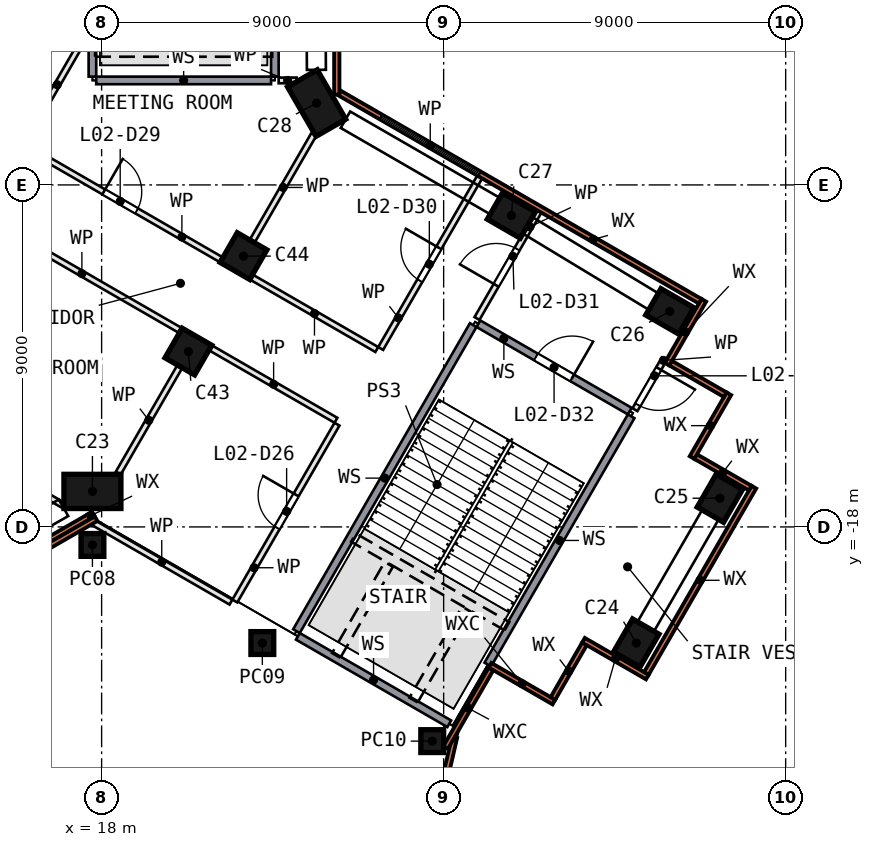
"""IFC4 building model, lengths in metres.
Left out: names, types, materials, properties, quantities, classifications, styles, units other than length and angle.
Written with IfcOpenShell. Run it as: python <this file> out.ifc"""

import sys

from ifc_helpers import new_model, si_unit, direction, frame, frame_2d, origin, origin_2d, place, context, subcontext, project, spatial, rectangle, extrude, element, fill, save


model = new_model("IFC4")
c1 = context("Model", 3, precision=1e-05, world=origin(), true_north=direction((0.0, 1.0)))
c2 = subcontext(c1, "Body", "Model", "MODEL_VIEW")
j1 = project(units=[si_unit("LENGTHUNIT", "METRE"), si_unit("PLANEANGLEUNIT", "RADIAN")], contexts=[c1])
p1 = place(None, origin())
s1 = spatial("IfcSite", under=j1, at=p1, CompositionType="ELEMENT")
p2 = place(p1, origin())
s2 = spatial("IfcBuilding", under=s1, at=p2, CompositionType="ELEMENT")
p3 = place(p2, frame((0.0, 0.0, 14.0)))
s3 = spatial("IfcBuildingStorey", under=s2, at=p3, CompositionType="ELEMENT", Elevation=14.0)
p4 = place(p3, frame((17.758, -17.065, 0.0), z_axis=(0.0, 0.0, 1.0), x_axis=(-1.0, 0.0, 0.0)))
e1 = element("IfcColumn", 1, at=p4, inside=s3, PredefinedType="COLUMN", context=c2, shape_type="SweptSolid", body=[
    extrude(rectangle(XDim=1.5, YDim=0.9, at=origin_2d()), origin(), (0.0, 0.0, 1.0), 4.55),
])
for number, where, z_axis, x_axis in (
    (2, (32.069, -21.055, 0.0), (0.0, 0.0, 1.0), (0.5, 0.866, 0.0)),
    (3, (34.269, -17.245, 0.0), (0.0, 0.0, 1.0), (0.5, 0.866, 0.0)),
    (4, (32.951, -12.327, 0.0), (0.0, 0.0, 1.0), (-0.866, 0.5, 0.0)),
    (5, (28.783, -9.805, 0.0), (0.0, 0.0, 1.0), (-0.866, 0.5, 0.0)),
):
    element("IfcColumn", number, at=place(p3, frame(where, z_axis=z_axis, x_axis=x_axis)), inside=s3, PredefinedType="COLUMN", context=c2, shape_type="SweptSolid", body=[
        extrude(rectangle(XDim=1.0, YDim=0.8, at=origin_2d()), origin(), (0.0, 0.0, 1.0), 4.55),
    ])
p5 = place(p3, frame((23.658, -6.846, 0.0), z_axis=(0.0, 0.0, 1.0), x_axis=(0.5, -0.866025404, 0.0)))
e6 = element("IfcColumn", 6, at=p5, inside=s3, PredefinedType="COLUMN", context=c2, shape_type="SweptSolid", body=[
    extrude(rectangle(XDim=1.5, YDim=0.9, at=origin_2d()), origin(), (0.0, 0.0, 1.0), 4.55),
])
for number, where, z_axis, x_axis in (
    (7, (20.283, -13.385, 0.0), (0.0, 0.0, 1.0), (0.866, -0.5, 0.0)),
    (8, (21.733, -10.873, 0.0), (0.0, 0.0, 1.0), (0.866, -0.5, 0.0)),
):
    element("IfcColumn", number, at=place(p3, frame(where, z_axis=z_axis, x_axis=x_axis)), inside=s3, PredefinedType="COLUMN", context=c2, shape_type="SweptSolid", body=[
        extrude(rectangle(XDim=0.9, YDim=0.9, at=origin_2d()), origin(), (0.0, 0.0, 1.0), 4.55),
    ])
for number, where, z_axis, x_axis in (
    (9, (17.758, -18.474, 0.0), (0.0, 0.0, 1.0), (0.0, -1.0, 0.0)),
    (10, (22.229, -21.055, 0.0), (0.0, 0.0, 1.0), (0.0, -1.0, 0.0)),
    (11, (26.7, -23.637, 0.0), (0.0, 0.0, 1.0), (0.0, -1.0, 0.0)),
):
    element("IfcColumn", number, at=place(p3, frame(where, z_axis=z_axis, x_axis=x_axis)), inside=s3, PredefinedType="COLUMN", context=c2, shape_type="SweptSolid", body=[
        extrude(rectangle(XDim=0.6, YDim=0.6, at=origin_2d()), origin(), (0.0, 0.0, 1.0), 5.0),
    ])
p6 = place(p3, frame((25.247, -32.36, 0.0), z_axis=(0.0, 0.0, 1.0), x_axis=(0.225288694, 0.974292053, 0.0)))
e12 = element("IfcWall", 12, at=p6, inside=s3, PredefinedType="SOLIDWALL", context=c2, shape_type="SweptSolid", body=[
    extrude(rectangle(XDim=9.056, YDim=0.14, at=frame_2d((4.528, 0.0))), origin(), (0.0, 0.0, 1.0), 4.55),
])
p7 = place(p6, frame((2.496, 0.0, 0.9)))
e13 = element("IfcOpeningElement", 13, at=p7, cuts=e12, PredefinedType="OPENING", context=c2, shape_type="SweptSolid", body=[
    extrude(rectangle(XDim=4.2, YDim=2.7, at=frame_2d((2.1, 1.35))), frame((0.0, 0.08, 0.0), z_axis=(0.0, -1.0, 0.0), x_axis=(1.0, 0.0, 0.0)), (0.0, 0.0, 1.0), 0.16),
])
p8 = place(p3, frame((27.051, -23.807, 0.0), z_axis=(0.0, 0.0, 1.0), x_axis=(0.499969813, 0.866042832, 0.0)))
e14 = element("IfcWall", 14, at=p8, inside=s3, PredefinedType="SOLIDWALL", context=c2, shape_type="SweptSolid", body=[
    extrude(rectangle(XDim=2.392, YDim=0.14, at=frame_2d((1.196, 0.0))), origin(), (0.0, 0.0, 1.0), 4.55),
])
p9 = place(p3, frame((28.221, -21.64, 0.0), z_axis=(0.0, 0.0, 1.0), x_axis=(0.866011627, -0.500023862, 0.0)))
e15 = element("IfcWall", 15, at=p9, inside=s3, PredefinedType="SOLIDWALL", context=c2, shape_type="SweptSolid", body=[
    extrude(rectangle(XDim=1.94, YDim=0.14, at=frame_2d((0.97, 0.0))), origin(), (0.0, 0.0, 1.0), 4.55),
])
p10 = place(p3, frame((29.875, -22.514, 0.0), z_axis=(0.0, 0.0, 1.0), x_axis=(0.499998264, 0.866026406, 0.0)))
e16 = element("IfcWall", 16, at=p10, inside=s3, PredefinedType="SOLIDWALL", context=c2, shape_type="SweptSolid", body=[
    extrude(rectangle(XDim=1.66, YDim=0.14, at=frame_2d((0.83, 0.0))), origin(), (0.0, 0.0, 1.0), 4.55),
])
p11 = place(p3, frame((30.68, -20.981, 0.0), z_axis=(0.0, 0.0, 1.0), x_axis=(0.866043088, -0.499969368, 0.0)))
e17 = element("IfcWall", 17, at=p11, inside=s3, PredefinedType="SOLIDWALL", context=c2, shape_type="SweptSolid", body=[
    extrude(rectangle(XDim=1.94, YDim=0.14, at=frame_2d((0.97, 0.0))), origin(), (0.0, 0.0, 1.0), 4.55),
])
p12 = place(p3, frame((32.334, -21.855, 0.0), z_axis=(0.0, 0.0, 1.0), x_axis=(0.499985074, 0.866034021, 0.0)))
e18 = element("IfcWall", 18, at=p12, inside=s3, PredefinedType="SOLIDWALL", context=c2, shape_type="SweptSolid", body=[
    extrude(rectangle(XDim=5.66, YDim=0.14, at=frame_2d((2.83, 0.0))), origin(), (0.0, 0.0, 1.0), 4.55),
])
p13 = place(p3, frame((35.069, -16.979, 0.0), z_axis=(0.0, 0.0, 1.0), x_axis=(-0.866053324, 0.499951638, 0.0)))
e19 = element("IfcWall", 19, at=p13, inside=s3, PredefinedType="SOLIDWALL", context=c2, shape_type="SweptSolid", body=[
    extrude(rectangle(XDim=1.66, YDim=0.14, at=frame_2d((0.83, 0.0))), origin(), (0.0, 0.0, 1.0), 4.55),
])
p14 = place(p3, frame((33.535, -16.175, 0.0), z_axis=(0.0, 0.0, 1.0), x_axis=(0.500063744, 0.865988598, 0.0)))
e20 = element("IfcWall", 20, at=p14, inside=s3, PredefinedType="SOLIDWALL", context=c2, shape_type="SweptSolid", body=[
    extrude(rectangle(XDim=1.94, YDim=0.14, at=frame_2d((0.97, 0.0))), origin(), (0.0, 0.0, 1.0), 4.55),
])
p15 = place(p3, frame((34.41, -14.52, 0.0), z_axis=(0.0, 0.0, 1.0), x_axis=(-0.865989634, 0.500061949, 0.0)))
e21 = element("IfcWall", 21, at=p15, inside=s3, PredefinedType="SOLIDWALL", context=c2, shape_type="SweptSolid", body=[
    extrude(rectangle(XDim=1.66, YDim=0.14, at=frame_2d((0.83, 0.0))), origin(), (0.0, 0.0, 1.0), 4.55),
])
p16 = place(p3, frame((32.877, -13.716, 0.0), z_axis=(0.0, 0.0, 1.0), x_axis=(0.500023862, 0.866011627, 0.0)))
e22 = element("IfcWall", 22, at=p16, inside=s3, PredefinedType="SOLIDWALL", context=c2, shape_type="SweptSolid", body=[
    extrude(rectangle(XDim=1.94, YDim=0.14, at=frame_2d((0.97, 0.0))), origin(), (0.0, 0.0, 1.0), 4.55),
])
p17 = place(p3, frame((33.751, -12.062, 0.0), z_axis=(0.0, 0.0, 1.0), x_axis=(-0.86602647, 0.499998154, 0.0)))
e23 = element("IfcWall", 23, at=p17, inside=s3, PredefinedType="SOLIDWALL", context=c2, shape_type="SweptSolid", body=[
    extrude(rectangle(XDim=10.961, YDim=0.14, at=frame_2d((5.481, 0.0))), origin(), (0.0, 0.0, 1.0), 4.55),
])
p18 = place(p17, frame((6.702, 0.0, 0.9)))
e24 = element("IfcOpeningElement", 24, at=p18, cuts=e23, PredefinedType="OPENING", context=c2, shape_type="SweptSolid", body=[
    extrude(rectangle(XDim=3.0, YDim=2.7, at=frame_2d((1.5, 1.35))), frame((0.0, 0.08, 0.0), z_axis=(0.0, -1.0, 0.0), x_axis=(1.0, 0.0, 0.0)), (0.0, 0.0, 1.0), 0.16),
])
p19 = place(p3, frame((24.188, -6.621, 0.0), z_axis=(0.0, 0.0, 1.0), x_axis=(0.0, 1.0, 0.0)))
e25 = element("IfcWall", 25, at=p19, inside=s3, PredefinedType="SOLIDWALL", context=c2, shape_type="SweptSolid", body=[
    extrude(rectangle(XDim=13.242, YDim=0.14, at=frame_2d((6.621, 0.0))), origin(), (0.0, 0.0, 1.0), 4.55),
])
p20 = place(p3, frame((6.603, -24.118, 0.0), z_axis=(0.0, 0.0, 1.0), x_axis=(0.866018135, 0.50001259, 0.0)))
e26 = element("IfcWall", 26, at=p20, inside=s3, PredefinedType="SOLIDWALL", context=c2, shape_type="SweptSolid", body=[
    extrude(rectangle(XDim=12.771, YDim=0.14, at=frame_2d((6.386, 0.0))), origin(), (0.0, 0.0, 1.0), 4.55),
])
p21 = place(p20, frame((1.883, 0.0, 0.9)))
e27 = element("IfcOpeningElement", 27, at=p21, cuts=e26, PredefinedType="OPENING", context=c2, shape_type="SweptSolid", body=[
    extrude(rectangle(XDim=2.4, YDim=2.7, at=frame_2d((1.2, 1.35))), frame((0.0, 0.08, 0.0), z_axis=(0.0, -1.0, 0.0), x_axis=(1.0, 0.0, 0.0)), (0.0, 0.0, 1.0), 0.16),
])
p22 = place(p20, frame((7.782, 0.0, 0.9)))
e28 = element("IfcOpeningElement", 28, at=p22, cuts=e26, PredefinedType="OPENING", context=c2, shape_type="SweptSolid", body=[
    extrude(rectangle(XDim=3.6, YDim=2.7, at=frame_2d((1.8, 1.35))), frame((0.0, 0.08, 0.0), z_axis=(0.0, -1.0, 0.0), x_axis=(1.0, 0.0, 0.0)), (0.0, 0.0, 1.0), 0.16),
])
p23 = place(p3, frame((17.688, -17.637, 0.0), z_axis=(0.0, 0.0, 1.0), x_axis=(0.500829891, -0.865545735, 0.0)))
e29 = element("IfcWall", 29, at=p23, inside=s3, PredefinedType="SOLIDWALL", context=c2, shape_type="SweptSolid", body=[
    extrude(rectangle(XDim=0.14, YDim=0.14, at=frame_2d((0.07, 0.0))), origin(), (0.0, 0.0, 1.0), 4.55),
])
p24 = place(p3, frame((17.854, -17.784, 0.0), z_axis=(0.0, 0.0, 1.0), x_axis=(-0.866036463, -0.499980844, 0.0)))
e30 = element("IfcWall", 30, at=p24, inside=s3, PredefinedType="SOLIDWALL", context=c2, shape_type="SweptSolid", body=[
    extrude(rectangle(XDim=7.334, YDim=0.14, at=frame_2d((3.667, 0.0))), origin(), (0.0, 0.0, 1.0), 4.55),
])
p25 = place(p24, frame((1.529, 0.0, 0.9)))
e31 = element("IfcOpeningElement", 31, at=p25, cuts=e30, PredefinedType="OPENING", context=c2, shape_type="SweptSolid", body=[
    extrude(rectangle(XDim=3.6, YDim=2.7, at=frame_2d((1.8, 1.35))), frame((0.0, 0.08, 0.0), z_axis=(0.0, -1.0, 0.0), x_axis=(1.0, 0.0, 0.0)), (0.0, 0.0, 1.0), 0.16),
])
p26 = place(p3, frame((12.014, -14.557, 0.0), z_axis=(0.0, 0.0, 1.0), x_axis=(0.866011812, -0.500023541, 0.0)))
e32 = element("IfcWall", 32, at=p26, inside=s3, PredefinedType="PARTITIONING", context=c2, shape_type="SweptSolid", body=[
    extrude(rectangle(XDim=5.732, YDim=0.15, at=frame_2d((2.866, 0.0))), origin(), (0.0, 0.0, 1.0), 4.55),
])
p27 = place(p26, frame((2.35, 0.0, 0.0)))
e33 = element("IfcOpeningElement", 33, at=p27, cuts=e32, PredefinedType="OPENING", context=c2, shape_type="SweptSolid", body=[
    extrude(rectangle(XDim=1.0, YDim=2.1, at=frame_2d((0.5, 1.05))), frame((0.0, 0.085, 0.0), z_axis=(0.0, -1.0, 0.0), x_axis=(1.0, 0.0, 0.0)), (0.0, 0.0, 1.0), 0.17),
])
p28 = place(p3, frame((14.906, -9.848, 0.0), z_axis=(0.0, 0.0, 1.0), x_axis=(0.866038559, -0.499977214, 0.0)))
e34 = element("IfcWall", 34, at=p28, inside=s3, PredefinedType="PARTITIONING", context=c2, shape_type="SweptSolid", body=[
    extrude(rectangle(XDim=5.945, YDim=0.15, at=frame_2d((2.973, 0.0))), origin(), (0.0, 0.0, 1.0), 4.55),
])
p29 = place(p3, frame((20.886, -13.3, 0.0), z_axis=(0.0, 0.0, 1.0), x_axis=(0.866012734, -0.500021944, 0.0)))
e35 = element("IfcWall", 35, at=p29, inside=s3, PredefinedType="PARTITIONING", context=c2, shape_type="SweptSolid", body=[
    extrude(rectangle(XDim=3.787, YDim=0.15, at=frame_2d((1.894, 0.0))), origin(), (0.0, 0.0, 1.0), 4.55),
])
p30 = place(p3, frame((18.438, -16.585, 0.0), z_axis=(0.0, 0.0, 1.0), x_axis=(0.500027049, 0.866009787, 0.0)))
e36 = element("IfcWall", 36, at=p30, inside=s3, PredefinedType="PARTITIONING", context=c2, shape_type="SweptSolid", body=[
    extrude(rectangle(XDim=3.215, YDim=0.15, at=frame_2d((1.607, 0.0))), origin(), (0.0, 0.0, 1.0), 4.55),
])
p31 = place(p3, frame((17.761, -17.875, 0.0), z_axis=(0.0, 0.0, 1.0), x_axis=(0.866016441, -0.500015524, 0.0)))
e37 = element("IfcWall", 37, at=p31, inside=s3, PredefinedType="PARTITIONING", context=c2, shape_type="SweptSolid", body=[
    extrude(rectangle(XDim=4.206, YDim=0.15, at=frame_2d((2.103, 0.0))), origin(), (0.0, 0.0, 1.0), 4.55),
])
p32 = place(p3, frame((17.858, -6.25, 0.0), z_axis=(0.0, 0.0, 1.0), x_axis=(1.0, 0.0, 0.0)))
e38 = element("IfcWall", 38, at=p32, inside=s3, PredefinedType="SOLIDWALL", context=c2, shape_type="SweptSolid", body=[
    extrude(rectangle(XDim=4.6, YDim=0.2, at=frame_2d((2.3, 0.0))), origin(), (0.0, 0.0, 1.0), 4.55),
])
p33 = place(p3, frame((17.708, -4.845, 0.0), z_axis=(0.0, 0.0, 1.0), x_axis=(-0.499993523, -0.866029143, 0.0)))
e39 = element("IfcWall", 39, at=p33, inside=s3, PredefinedType="PARTITIONING", context=c2, shape_type="SweptSolid", body=[
    extrude(rectangle(XDim=3.508, YDim=0.15, at=frame_2d((1.754, 0.0))), origin(), (0.0, 0.0, 1.0), 4.55),
])
p34 = place(p3, frame((17.758, 3.15, 0.0), z_axis=(0.0, 0.0, 1.0), x_axis=(0.0, -1.0, 0.0)))
e40 = element("IfcWall", 40, at=p34, inside=s3, PredefinedType="SOLIDWALL", context=c2, shape_type="SweptSolid", body=[
    extrude(rectangle(XDim=9.3, YDim=0.2, at=frame_2d((4.65, 0.0))), origin(), (0.0, 0.0, 1.0), 4.55),
])
p35 = place(p3, frame((21.975, -10.458, 0.0), z_axis=(0.0, 0.0, 1.0), x_axis=(0.500027049, 0.866009787, 0.0)))
e41 = element("IfcWall", 41, at=p35, inside=s3, PredefinedType="PARTITIONING", context=c2, shape_type="SweptSolid", body=[
    extrude(rectangle(XDim=3.215, YDim=0.15, at=frame_2d((1.607, 0.0))), origin(), (0.0, 0.0, 1.0), 4.55),
])
p36 = place(p3, frame((22.558, -6.15, 0.0), z_axis=(0.0, 0.0, 1.0), x_axis=(0.0, 1.0, 0.0)))
e42 = element("IfcWall", 42, at=p36, inside=s3, PredefinedType="SOLIDWALL", context=c2, shape_type="SweptSolid", body=[
    extrude(rectangle(XDim=9.5, YDim=0.2, at=frame_2d((4.75, 0.0))), origin(), (0.0, 0.0, 1.0), 4.55),
])
p37 = place(p3, frame((22.658, -6.25, 0.0), z_axis=(0.0, 0.0, 1.0), x_axis=(1.0, 0.0, 0.0)))
e43 = element("IfcWall", 43, at=p37, inside=s3, PredefinedType="PARTITIONING", context=c2, shape_type="SweptSolid", body=[
    extrude(rectangle(XDim=0.473, YDim=0.15, at=frame_2d((0.237, 0.0))), origin(), (0.0, 0.0, 1.0), 4.55),
])
p38 = place(p3, frame((23.164, -20.879, 0.0), z_axis=(0.0, 0.0, 1.0), x_axis=(0.866030039, -0.499991972, 0.0)))
e44 = element("IfcWall", 44, at=p38, inside=s3, PredefinedType="SOLIDWALL", context=c2, shape_type="SweptSolid", body=[
    extrude(rectangle(XDim=4.6, YDim=0.2, at=frame_2d((2.3, 0.0))), origin(), (0.0, 0.0, 1.0), 4.55),
])
p39 = place(p3, frame((21.506, -19.951, 0.0), z_axis=(0.0, 0.0, 1.0), x_axis=(0.500008168, 0.866020688, 0.0)))
e45 = element("IfcWall", 45, at=p39, inside=s3, PredefinedType="PARTITIONING", context=c2, shape_type="SweptSolid", body=[
    extrude(rectangle(XDim=5.375, YDim=0.15, at=frame_2d((2.688, 0.0))), origin(), (0.0, 0.0, 1.0), 4.55),
])
p40 = place(p39, frame((2.225, 0.0, 0.0)))
e46 = element("IfcOpeningElement", 46, at=p40, cuts=e45, PredefinedType="OPENING", context=c2, shape_type="SweptSolid", body=[
    extrude(rectangle(XDim=1.0, YDim=2.1, at=frame_2d((0.5, 1.05))), frame((0.0, 0.085, 0.0), z_axis=(0.0, -1.0, 0.0), x_axis=(1.0, 0.0, 0.0)), (0.0, 0.0, 1.0), 0.17),
])
p41 = place(p3, frame((15.982, -7.986, 0.0), z_axis=(0.0, 0.0, 1.0), x_axis=(0.86601051, -0.500025795, 0.0)))
e47 = element("IfcWall", 47, at=p41, inside=s3, PredefinedType="PARTITIONING", context=c2, shape_type="SweptSolid", body=[
    extrude(rectangle(XDim=5.945, YDim=0.15, at=frame_2d((2.973, 0.0))), origin(), (0.0, 0.0, 1.0), 4.55),
])
p42 = place(p41, frame((2.395, 0.0, 0.0)))
e48 = element("IfcOpeningElement", 48, at=p42, cuts=e47, PredefinedType="OPENING", context=c2, shape_type="SweptSolid", body=[
    extrude(rectangle(XDim=1.0, YDim=2.1, at=frame_2d((0.5, 1.05))), frame((0.0, 0.085, 0.0), z_axis=(0.0, -1.0, 0.0), x_axis=(1.0, 0.0, 0.0)), (0.0, 0.0, 1.0), 0.17),
])
p43 = place(p3, frame((25.241, -13.332, 0.0), z_axis=(0.0, 0.0, 1.0), x_axis=(-0.866040651, 0.499973591, 0.0)))
e49 = element("IfcWall", 49, at=p43, inside=s3, PredefinedType="PARTITIONING", context=c2, shape_type="SweptSolid", body=[
    extrude(rectangle(XDim=3.787, YDim=0.15, at=frame_2d((1.894, 0.0))), origin(), (0.0, 0.0, 1.0), 4.55),
])
p44 = place(p3, frame((28.162, -21.623, 0.0), z_axis=(0.0, 0.0, 1.0), x_axis=(0.499981072, 0.866036332, 0.0)))
e50 = element("IfcWall", 50, at=p44, inside=s3, PredefinedType="SOLIDWALL", context=c2, shape_type="SweptSolid", body=[
    extrude(rectangle(XDim=7.545, YDim=0.2, at=frame_2d((3.772, 0.0))), origin(), (0.0, 0.0, 1.0), 4.55),
])
p45 = place(p3, frame((27.777, -12.688, 0.0), z_axis=(0.0, 0.0, 1.0), x_axis=(-0.500004225, -0.866022964, 0.0)))
e51 = element("IfcWall", 51, at=p45, inside=s3, PredefinedType="SOLIDWALL", context=c2, shape_type="SweptSolid", body=[
    extrude(rectangle(XDim=9.3, YDim=0.2, at=frame_2d((4.65, 0.0))), origin(), (0.0, 0.0, 1.0), 4.55),
])
p46 = place(p3, frame((25.343, -13.304, 0.0), z_axis=(0.0, 0.0, 1.0), x_axis=(0.499979347, 0.866037328, 0.0)))
e52 = element("IfcWall", 52, at=p46, inside=s3, PredefinedType="PARTITIONING", context=c2, shape_type="SweptSolid", body=[
    extrude(rectangle(XDim=5.21, YDim=0.15, at=frame_2d((2.605, 0.0))), origin(), (0.0, 0.0, 1.0), 4.55),
])
p47 = place(p46, frame((2.06, 0.0, 0.0)))
e53 = element("IfcOpeningElement", 53, at=p47, cuts=e52, PredefinedType="OPENING", context=c2, shape_type="SweptSolid", body=[
    extrude(rectangle(XDim=1.0, YDim=2.1, at=frame_2d((0.5, 1.05))), frame((0.0, 0.085, 0.0), z_axis=(0.0, -1.0, 0.0), x_axis=(1.0, 0.0, 0.0)), (0.0, 0.0, 1.0), 0.17),
])
p48 = place(p3, frame((27.877, -12.515, 0.0), z_axis=(0.0, 0.0, 1.0), x_axis=(0.499973122, 0.866040921, 0.0)))
e54 = element("IfcWall", 54, at=p48, inside=s3, PredefinedType="PARTITIONING", context=c2, shape_type="SweptSolid", body=[
    extrude(rectangle(XDim=3.26, YDim=0.15, at=frame_2d((1.63, 0.0))), origin(), (0.0, 0.0, 1.0), 4.55),
])
p49 = place(p48, frame((1.01, 0.0, 0.0)))
e55 = element("IfcOpeningElement", 55, at=p49, cuts=e54, PredefinedType="OPENING", context=c2, shape_type="SweptSolid", body=[
    extrude(rectangle(XDim=1.1, YDim=2.1, at=frame_2d((0.55, 1.05))), frame((0.0, 0.085, 0.0), z_axis=(0.0, -1.0, 0.0), x_axis=(1.0, 0.0, 0.0)), (0.0, 0.0, 1.0), 0.17),
])
p50 = place(p3, frame((27.914, -12.652, 0.0), z_axis=(0.0, 0.0, 1.0), x_axis=(0.86601677, -0.500014953, 0.0)))
e56 = element("IfcWall", 56, at=p50, inside=s3, PredefinedType="SOLIDWALL", context=c2, shape_type="SweptSolid", body=[
    extrude(rectangle(XDim=4.6, YDim=0.2, at=frame_2d((2.3, 0.0))), origin(), (0.0, 0.0, 1.0), 4.55),
])
p51 = place(p50, frame((1.75, 0.0, 0.0)))
e57 = element("IfcOpeningElement", 57, at=p51, cuts=e56, PredefinedType="OPENING", context=c2, shape_type="SweptSolid", body=[
    extrude(rectangle(XDim=1.1, YDim=2.1, at=frame_2d((0.55, 1.05))), frame((0.0, 0.11, 0.0), z_axis=(0.0, -1.0, 0.0), x_axis=(1.0, 0.0, 0.0)), (0.0, 0.0, 1.0), 0.22),
])
p52 = place(p3, frame((32.807, -13.577, 0.0), z_axis=(0.0, 0.0, 1.0), x_axis=(-0.499995951, -0.866027742, 0.0)))
e58 = element("IfcWall", 58, at=p52, inside=s3, PredefinedType="PARTITIONING", context=c2, shape_type="SweptSolid", body=[
    extrude(rectangle(XDim=1.545, YDim=0.15, at=frame_2d((0.773, 0.0))), origin(), (0.0, 0.0, 1.0), 4.55),
])
p53 = place(p52, frame((0.295, 0.0, 0.0)))
e59 = element("IfcOpeningElement", 59, at=p53, cuts=e58, PredefinedType="OPENING", context=c2, shape_type="SweptSolid", body=[
    extrude(rectangle(XDim=1.1, YDim=2.1, at=frame_2d((0.55, 1.05))), frame((0.0, 0.085, 0.0), z_axis=(0.0, -1.0, 0.0), x_axis=(1.0, 0.0, 0.0)), (0.0, 0.0, 1.0), 0.17),
])
p54 = place(p18, origin())
e60 = element("IfcWindow", 60, at=p54, inside=s3, PartitioningType="SINGLE_PANEL", PredefinedType="WINDOW", context=c2, shape_type="SweptSolid", body=[
    extrude(rectangle(XDim=3.0, YDim=2.7, at=frame_2d((1.5, 1.35))), frame((0.0, 0.03, 0.0), z_axis=(0.0, -1.0, 0.0), x_axis=(1.0, 0.0, 0.0)), (0.0, 0.0, 1.0), 0.06),
])
fill(e24, e60)
p55 = place(p40, origin())
e61 = element("IfcDoor", 61, at=p55, inside=s3, OperationType="SINGLE_SWING_RIGHT", PredefinedType="DOOR", context=c2, shape_type="SweptSolid", body=[
    extrude(rectangle(XDim=1.0, YDim=2.1, at=frame_2d((0.5, 1.05))), frame((0.0, 0.025, 0.0), z_axis=(0.0, -1.0, 0.0), x_axis=(1.0, 0.0, 0.0)), (0.0, 0.0, 1.0), 0.05),
])
fill(e46, e61)
p56 = place(p42, origin())
e62 = element("IfcDoor", 62, at=p56, inside=s3, OperationType="SINGLE_SWING_LEFT", PredefinedType="DOOR", context=c2, shape_type="SweptSolid", body=[
    extrude(rectangle(XDim=1.0, YDim=2.1, at=frame_2d((0.5, 1.05))), frame((0.0, 0.025, 0.0), z_axis=(0.0, -1.0, 0.0), x_axis=(1.0, 0.0, 0.0)), (0.0, 0.0, 1.0), 0.05),
])
fill(e48, e62)
p57 = place(p47, origin())
e63 = element("IfcDoor", 63, at=p57, inside=s3, OperationType="SINGLE_SWING_RIGHT", PredefinedType="DOOR", context=c2, shape_type="SweptSolid", body=[
    extrude(rectangle(XDim=1.0, YDim=2.1, at=frame_2d((0.5, 1.05))), frame((0.0, 0.025, 0.0), z_axis=(0.0, -1.0, 0.0), x_axis=(1.0, 0.0, 0.0)), (0.0, 0.0, 1.0), 0.05),
])
fill(e53, e63)
p58 = place(p49, origin())
e64 = element("IfcDoor", 64, at=p58, inside=s3, OperationType="SINGLE_SWING_LEFT", PredefinedType="DOOR", context=c2, shape_type="SweptSolid", body=[
    extrude(rectangle(XDim=1.1, YDim=2.1, at=frame_2d((0.55, 1.05))), frame((0.0, 0.025, 0.0), z_axis=(0.0, -1.0, 0.0), x_axis=(1.0, 0.0, 0.0)), (0.0, 0.0, 1.0), 0.05),
])
fill(e55, e64)
p59 = place(p51, origin())
e65 = element("IfcDoor", 65, at=p59, inside=s3, OperationType="SINGLE_SWING_RIGHT", PredefinedType="DOOR", context=c2, shape_type="SweptSolid", body=[
    extrude(rectangle(XDim=1.1, YDim=2.1, at=frame_2d((0.55, 1.05))), frame((0.0, 0.025, 0.0), z_axis=(0.0, -1.0, 0.0), x_axis=(1.0, 0.0, 0.0)), (0.0, 0.0, 1.0), 0.05),
])
fill(e57, e65)
p60 = place(p53, origin())
e66 = element("IfcDoor", 66, at=p60, inside=s3, OperationType="SINGLE_SWING_LEFT", PredefinedType="DOOR", context=c2, shape_type="SweptSolid", body=[
    extrude(rectangle(XDim=1.1, YDim=2.1, at=frame_2d((0.55, 1.05))), frame((0.0, 0.025, 0.0), z_axis=(0.0, -1.0, 0.0), x_axis=(1.0, 0.0, 0.0)), (0.0, 0.0, 1.0), 0.05),
])
fill(e59, e66)
save(model, sys.argv[1])
